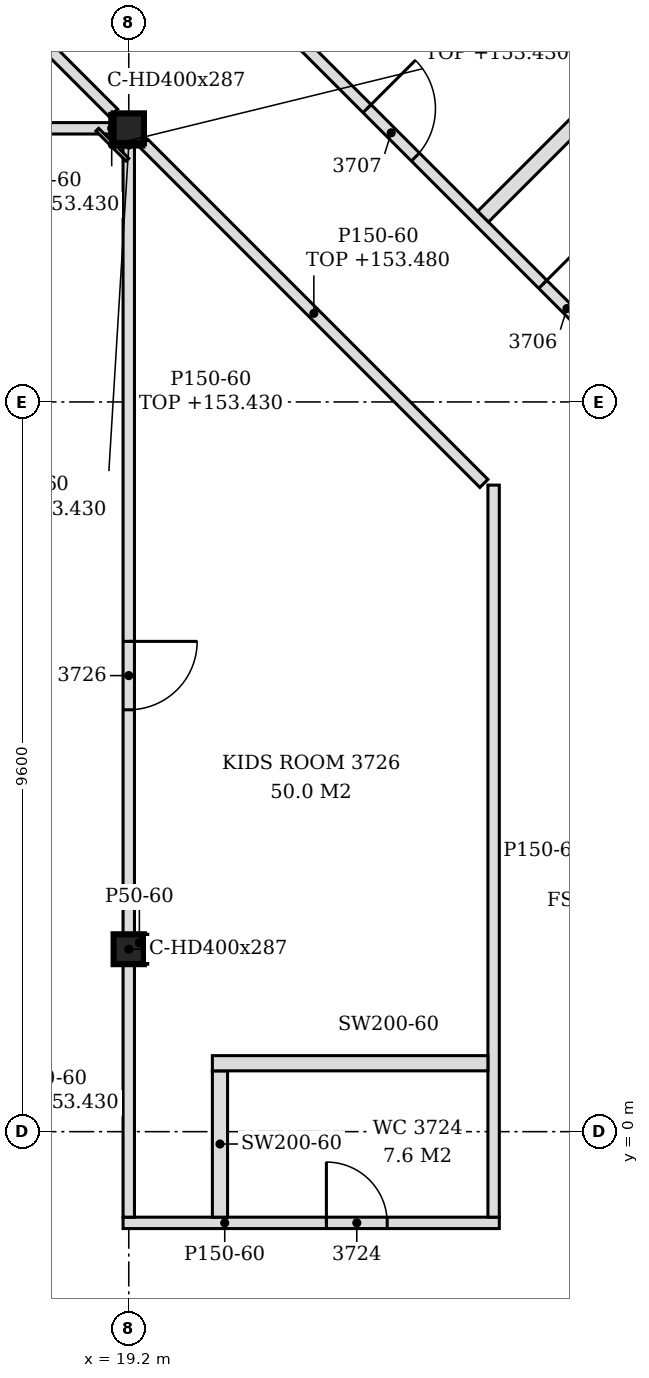
"""IFC4 building model, lengths in metres.
Left out: names, types, materials, properties, quantities, classifications, styles, units other than length and angle.
Written with IfcOpenShell. Run it as: python <this file> out.ifc"""

import sys

from ifc_helpers import new_model, si_unit, direction, frame, frame_2d, origin, origin_2d, place, context, subcontext, project, spatial, polyline, rectangle, i_section, outline, extrude, element, fill, save


model = new_model("IFC4")
c1 = context("Model", 3, precision=1e-05, world=origin(), true_north=direction((0.0, 1.0)))
c2 = subcontext(c1, "Body", "Model", "MODEL_VIEW")
j1 = project(units=[si_unit("LENGTHUNIT", "METRE"), si_unit("PLANEANGLEUNIT", "RADIAN")], contexts=[c1])
p1 = place(None, origin())
s1 = spatial("IfcSite", under=j1, at=p1, CompositionType="ELEMENT")
p2 = place(p1, origin())
s2 = spatial("IfcBuilding", under=s1, at=p2, CompositionType="ELEMENT")
p3 = place(p2, frame((0.0, 0.0, 150.6)))
s3 = spatial("IfcBuildingStorey", under=s2, at=p3, CompositionType="ELEMENT", Elevation=150.6)
for number, where, z_axis, x_axis in (
    (1, (19.2, 2.4, -0.15), (0.0, 0.0, 1.0), (1.0, 0.0, 0.0)),
    (2, (19.2, 13.2, -0.15), (0.0, 0.0, 1.0), (1.0, 0.0, 0.0)),
):
    element("IfcColumn", number, at=place(p3, frame(where, z_axis=z_axis, x_axis=x_axis)), inside=s3, PredefinedType="COLUMN", context=c2, shape_type="SweptSolid", body=[
        extrude(i_section(OverallWidth=0.399, OverallDepth=0.393, WebThickness=0.023, FlangeThickness=0.037, FilletRadius=0.015, at=origin_2d()), origin(), (0.0, 0.0, 1.0), 3.6),
    ])
p4 = place(p3, frame((19.125, -1.2, 0.0), z_axis=(0.0, 0.0, 1.0), x_axis=(1.0, 0.0, 0.0)))
e3 = element("IfcWall", 3, at=p4, inside=s3, PredefinedType="PARTITIONING", context=c2, shape_type="SweptSolid", body=[
    extrude(outline(polyline([(0.0, 0.0), (4.95, 0.0), (4.95, 3.45), (0.225, 3.45), (0.223, 2.83), (0.0, 2.83), (0.0, 0.0)])), frame((0.0, 0.075, 0.0), z_axis=(0.0, -1.0, 0.0), x_axis=(1.0, 0.0, 0.0)), (0.0, 0.0, 1.0), 0.15),
])
p5 = place(p4, frame((2.675, 0.0, 0.0)))
e4 = element("IfcOpeningElement", 4, at=p5, cuts=e3, PredefinedType="OPENING", context=c2, shape_type="SweptSolid", body=[
    extrude(rectangle(XDim=0.8, YDim=2.1, at=frame_2d((0.4, 1.05))), frame((0.0, 0.085, 0.0), z_axis=(0.0, -1.0, 0.0), x_axis=(1.0, 0.0, 0.0)), (0.0, 0.0, 1.0), 0.17),
])
p6 = place(p3, frame((19.2, -1.125, 0.0), z_axis=(0.0, 0.0, 1.0), x_axis=(0.0, 1.0, 0.0)))
e5 = element("IfcWall", 5, at=p6, inside=s3, PredefinedType="PARTITIONING", context=c2, shape_type="SweptSolid", body=[
    extrude(rectangle(XDim=3.329, YDim=0.15, at=frame_2d((1.664, 0.0))), origin(), (0.0, 0.0, 1.0), 2.83),
])
p7 = place(p3, frame((20.4, -1.125, 0.0), z_axis=(0.0, 0.0, 1.0), x_axis=(0.0, 1.0, 0.0)))
e6 = element("IfcWall", 6, at=p7, inside=s3, PredefinedType="PARTITIONING", context=c2, shape_type="SweptSolid", body=[
    extrude(outline(polyline([(0.0, 0.0), (1.925, 0.0), (1.925, 3.45), (1.23, 3.45), (1.228, 2.88), (1.02, 2.88), (1.018, 3.45), (0.0, 3.45), (0.0, 0.0)])), frame((0.0, 0.1, 0.0), z_axis=(0.0, -1.0, 0.0), x_axis=(1.0, 0.0, 0.0)), (0.0, 0.0, 1.0), 0.2),
])
p8 = place(p3, frame((24.0, -1.125, 0.0), z_axis=(0.0, 0.0, 1.0), x_axis=(0.0, 1.0, 0.0)))
e7 = element("IfcWall", 7, at=p8, inside=s3, PredefinedType="PARTITIONING", context=c2, shape_type="SweptSolid", body=[
    extrude(outline(polyline([(0.0, 0.0), (9.631, 0.0), (9.631, 3.45), (6.03, 3.45), (6.028, 2.88), (5.82, 2.88), (5.818, 3.45), (1.23, 3.45), (1.228, 2.88), (1.02, 2.88), (1.018, 3.45), (0.0, 3.45), (0.0, 0.0)])), frame((0.0, 0.075, 0.0), z_axis=(0.0, -1.0, 0.0), x_axis=(1.0, 0.0, 0.0)), (0.0, 0.0, 1.0), 0.15),
])
p9 = place(p3, frame((20.3, 0.9, 0.0), z_axis=(0.0, 0.0, 1.0), x_axis=(1.0, 0.0, 0.0)))
e8 = element("IfcWall", 8, at=p9, inside=s3, PredefinedType="PARTITIONING", context=c2, shape_type="SweptSolid", body=[
    extrude(rectangle(XDim=3.625, YDim=0.2, at=frame_2d((1.812, 0.0))), origin(), (0.0, 0.0, 1.0), 3.45),
])
p10 = place(p3, frame((19.2, 2.596, 0.0), z_axis=(0.0, 0.0, 1.0), x_axis=(0.0, 1.0, 0.0)))
e9 = element("IfcWall", 9, at=p10, inside=s3, PredefinedType="PARTITIONING", context=c2, shape_type="SweptSolid", body=[
    extrude(rectangle(XDim=10.407, YDim=0.15, at=frame_2d((5.204, 0.0))), origin(), (0.0, 0.0, 1.0), 2.83),
])
p11 = place(p10, frame((2.954, 0.0, 0.0)))
e10 = element("IfcOpeningElement", 10, at=p11, cuts=e9, PredefinedType="OPENING", context=c2, shape_type="SweptSolid", body=[
    extrude(rectangle(XDim=0.9, YDim=2.1, at=frame_2d((0.45, 1.05))), frame((0.0, 0.085, 0.0), z_axis=(0.0, -1.0, 0.0), x_axis=(1.0, 0.0, 0.0)), (0.0, 0.0, 1.0), 0.17),
])
p12 = place(p3, frame((23.872, 8.528, 0.0), z_axis=(0.0, 0.0, 1.0), x_axis=(-0.707126073897, 0.70708748795, 0.0)))
e11 = element("IfcWall", 11, at=p12, inside=s3, PredefinedType="PARTITIONING", context=c2, shape_type="SweptSolid", body=[
    extrude(rectangle(XDim=6.327, YDim=0.15, at=frame_2d((3.164, 0.0))), origin(), (0.0, 0.0, 1.0), 2.88),
])
p13 = place(p3, frame((26.272, 9.522, 0.0), z_axis=(0.0, 0.0, 1.0), x_axis=(-0.707097742657, 0.707115819601, 0.0)))
e12 = element("IfcWall", 12, at=p13, inside=s3, PredefinedType="PARTITIONING", context=c2, shape_type="SweptSolid", body=[
    extrude(rectangle(XDim=13.506, YDim=0.15, at=frame_2d((6.753, 0.0))), origin(), (0.0, 0.0, 1.0), 2.73),
])
p14 = place(p13, frame((1.398, 0.0, 0.0)))
e13 = element("IfcOpeningElement", 13, at=p14, cuts=e12, PredefinedType="OPENING", context=c2, shape_type="SweptSolid", body=[
    extrude(rectangle(XDim=0.9, YDim=2.1, at=frame_2d((0.45, 1.05))), frame((0.0, 0.085, 0.0), z_axis=(0.0, -1.0, 0.0), x_axis=(1.0, 0.0, 0.0)), (0.0, 0.0, 1.0), 0.17),
])
p15 = place(p13, frame((4.668, 0.0, 0.0)))
e14 = element("IfcOpeningElement", 14, at=p15, cuts=e12, PredefinedType="OPENING", context=c2, shape_type="SweptSolid", body=[
    extrude(rectangle(XDim=0.9, YDim=2.1, at=frame_2d((0.45, 1.05))), frame((0.0, 0.085, 0.0), z_axis=(0.0, -1.0, 0.0), x_axis=(1.0, 0.0, 0.0)), (0.0, 0.0, 1.0), 0.17),
])
p16 = place(p13, frame((7.938, 0.0, 0.0)))
e15 = element("IfcOpeningElement", 15, at=p16, cuts=e12, PredefinedType="OPENING", context=c2, shape_type="SweptSolid", body=[
    extrude(rectangle(XDim=0.9, YDim=2.1, at=frame_2d((0.45, 1.05))), frame((0.0, 0.085, 0.0), z_axis=(0.0, -1.0, 0.0), x_axis=(1.0, 0.0, 0.0)), (0.0, 0.0, 1.0), 0.17),
])
p17 = place(p13, frame((11.405, 0.0, 0.0)))
e16 = element("IfcOpeningElement", 16, at=p17, cuts=e12, PredefinedType="OPENING", context=c2, shape_type="SweptSolid", body=[
    extrude(rectangle(XDim=0.9, YDim=2.1, at=frame_2d((0.45, 1.05))), frame((0.0, 0.085, 0.0), z_axis=(0.0, -1.0, 0.0), x_axis=(1.0, 0.0, 0.0)), (0.0, 0.0, 1.0), 0.17),
])
p18 = place(p3, frame((23.862, 12.038, 0.0), z_axis=(0.0, 0.0, 1.0), x_axis=(0.707106781187, 0.707106781187, 0.0)))
e17 = element("IfcWall", 17, at=p18, inside=s3, PredefinedType="PARTITIONING", context=c2, shape_type="SweptSolid", body=[
    extrude(rectangle(XDim=8.929, YDim=0.2, at=frame_2d((4.464, 0.0))), origin(), (0.0, 0.0, 1.0), 2.88),
])
p19 = place(p3, frame((7.399, 13.2, 0.0), z_axis=(0.0, 0.0, 1.0), x_axis=(1.0, 0.0, 0.0)))
e18 = element("IfcWall", 18, at=p19, inside=s3, PredefinedType="PARTITIONING", context=c2, shape_type="SweptSolid", body=[
    extrude(rectangle(XDim=11.601, YDim=0.15, at=frame_2d((5.801, 0.0))), origin(), (0.0, 0.0, 1.0), 2.83),
])
p20 = place(p19, frame((2.051, 0.0, 0.0)))
e19 = element("IfcOpeningElement", 19, at=p20, cuts=e18, PredefinedType="OPENING", context=c2, shape_type="SweptSolid", body=[
    extrude(rectangle(XDim=0.9, YDim=2.1, at=frame_2d((0.45, 1.05))), frame((0.0, 0.085, 0.0), z_axis=(0.0, -1.0, 0.0), x_axis=(1.0, 0.0, 0.0)), (0.0, 0.0, 1.0), 0.17),
])
p21 = place(p3, frame((19.002, 13.398, 0.0), z_axis=(0.0, 0.0, 1.0), x_axis=(-0.707080416772, 0.707133144618, 0.0)))
e20 = element("IfcWall", 20, at=p21, inside=s3, PredefinedType="PARTITIONING", context=c2, shape_type="SweptSolid", body=[
    extrude(rectangle(XDim=4.63, YDim=0.15, at=frame_2d((2.315, 0.0))), origin(), (0.0, 0.0, 1.0), 3.45),
])
p22 = place(p3, frame((19.425, 2.204, 0.0), z_axis=(0.0, 0.0, 1.0), x_axis=(0.0, 1.0, 0.0)))
e21 = element("IfcWall", 21, at=p22, inside=s3, PredefinedType="PARTITIONING", context=c2, shape_type="SweptSolid", body=[
    extrude(rectangle(XDim=0.393, YDim=0.05, at=frame_2d((0.196, 0.0))), origin(), (0.0, 0.0, 1.0), 3.45),
])
p23 = place(p3, frame((18.976, 13.003, 0.0), z_axis=(0.0, 0.0, 1.0), x_axis=(0.0, 1.0, 0.0)))
e22 = element("IfcWall", 22, at=p23, inside=s3, PredefinedType="PARTITIONING", context=c2, shape_type="SweptSolid", body=[
    extrude(rectangle(XDim=0.393, YDim=0.05, at=frame_2d((0.197, 0.0))), origin(), (0.0, 0.0, 1.0), 2.83),
])
p24 = place(p3, frame((19.182, 12.786, 0.0), z_axis=(0.0, 0.0, 1.0), x_axis=(-0.707106781187, 0.707106781187, 0.0)))
e23 = element("IfcWall", 23, at=p24, inside=s3, PredefinedType="PARTITIONING", context=c2, shape_type="SweptSolid", body=[
    extrude(rectangle(XDim=0.56, YDim=0.05, at=frame_2d((0.28, 0.0))), origin(), (0.0, 0.0, 1.0), 2.83),
])
p25 = place(p3, frame((19.0, 12.979, 0.0), z_axis=(0.0, 0.0, 1.0), x_axis=(1.0, 0.0, 0.0)))
e24 = element("IfcWall", 24, at=p25, inside=s3, PredefinedType="PARTITIONING", context=c2, shape_type="SweptSolid", body=[
    extrude(rectangle(XDim=0.399, YDim=0.05, at=frame_2d((0.199, 0.0))), origin(), (0.0, 0.0, 1.0), 2.83),
])
p26 = place(p14, frame((0.9, 0.0, 0.0), z_axis=(0.0, 0.0, 1.0), x_axis=(-1.0, 0.0, 0.0)))
e25 = element("IfcDoor", 25, at=p26, inside=s3, OperationType="SINGLE_SWING_LEFT", PredefinedType="DOOR", context=c2, shape_type="SweptSolid", body=[
    extrude(rectangle(XDim=0.9, YDim=2.1, at=frame_2d((0.45, 1.05))), frame((0.0, 0.025, 0.0), z_axis=(0.0, -1.0, 0.0), x_axis=(1.0, 0.0, 0.0)), (0.0, 0.0, 1.0), 0.05),
])
fill(e13, e25)
p27 = place(p15, frame((0.9, 0.0, 0.0), z_axis=(0.0, 0.0, 1.0), x_axis=(-1.0, 0.0, 0.0)))
e26 = element("IfcDoor", 26, at=p27, inside=s3, OperationType="SINGLE_SWING_LEFT", PredefinedType="DOOR", context=c2, shape_type="SweptSolid", body=[
    extrude(rectangle(XDim=0.9, YDim=2.1, at=frame_2d((0.45, 1.05))), frame((0.0, 0.025, 0.0), z_axis=(0.0, -1.0, 0.0), x_axis=(1.0, 0.0, 0.0)), (0.0, 0.0, 1.0), 0.05),
])
fill(e14, e26)
p28 = place(p5, origin())
e27 = element("IfcDoor", 27, at=p28, inside=s3, OperationType="SINGLE_SWING_LEFT", PredefinedType="DOOR", context=c2, shape_type="SweptSolid", body=[
    extrude(rectangle(XDim=0.8, YDim=2.1, at=frame_2d((0.4, 1.05))), frame((0.0, 0.025, 0.0), z_axis=(0.0, -1.0, 0.0), x_axis=(1.0, 0.0, 0.0)), (0.0, 0.0, 1.0), 0.05),
])
fill(e4, e27)
p29 = place(p11, frame((0.9, 0.0, 0.0), z_axis=(0.0, 0.0, 1.0), x_axis=(-1.0, 0.0, 0.0)))
e28 = element("IfcDoor", 28, at=p29, inside=s3, OperationType="SINGLE_SWING_LEFT", PredefinedType="DOOR", context=c2, shape_type="SweptSolid", body=[
    extrude(rectangle(XDim=0.9, YDim=2.1, at=frame_2d((0.45, 1.05))), frame((0.0, 0.025, 0.0), z_axis=(0.0, -1.0, 0.0), x_axis=(1.0, 0.0, 0.0)), (0.0, 0.0, 1.0), 0.05),
])
fill(e10, e28)
save(model, sys.argv[1])
